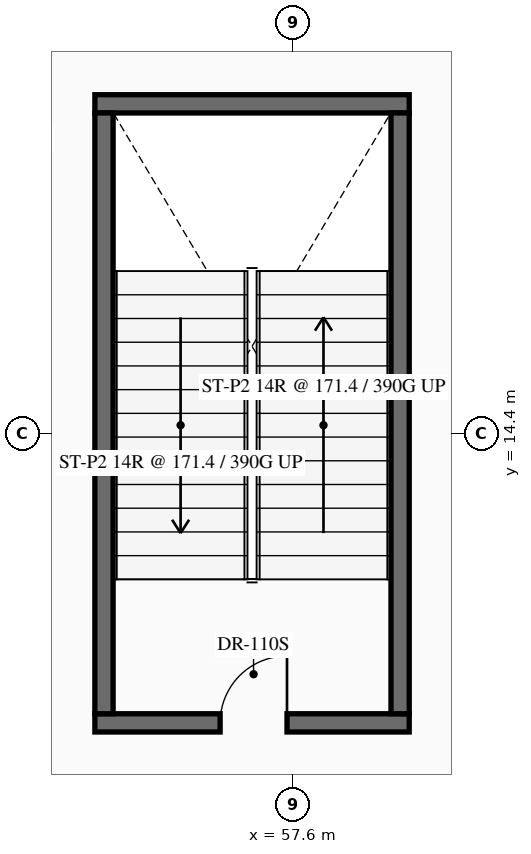
"""IFC4 building model, lengths in metres.
Left out: names, types, materials, properties, quantities, classifications, styles, units other than length and angle.
Written with IfcOpenShell. Run it as: python <this file> out.ifc"""

import sys

from ifc_helpers import new_model, si_unit, direction, frame, frame_2d, origin, place, context, subcontext, project, spatial, rectangle, extrude, element, fill, save


model = new_model("IFC4")
c1 = context("Model", 3, precision=1e-05, world=origin(), true_north=direction((0.0, 1.0)))
c2 = subcontext(c1, "Body", "Model", "MODEL_VIEW")
j1 = project(units=[si_unit("LENGTHUNIT", "METRE"), si_unit("PLANEANGLEUNIT", "RADIAN")], contexts=[c1])
p1 = place(None, origin())
s1 = spatial("IfcSite", under=j1, at=p1, CompositionType="ELEMENT")
p2 = place(p1, origin())
s2 = spatial("IfcBuilding", under=s1, at=p2, CompositionType="ELEMENT")
p3 = place(p2, frame((0.0, 0.0, -4.8)))
s3 = spatial("IfcBuildingStorey", under=s2, at=p3, CompositionType="ELEMENT", Elevation=-4.8)
p4 = place(p3, frame((54.34, 9.64, 0.0), z_axis=(0.0, 0.0, 1.0), x_axis=(1.0, 0.0, 0.0)))
e1 = element("IfcWall", 1, at=p4, inside=s3, PredefinedType="SHEAR", context=c2, shape_type="SweptSolid", body=[
    extrude(rectangle(XDim=5.17, YDim=0.3, at=frame_2d((2.585, 0.0))), origin(), (0.0, 0.0, 1.0), 4.8),
])
p5 = place(p4, frame((2.06, 0.0, 0.0)))
e2 = element("IfcOpeningElement", 2, at=p5, cuts=e1, PredefinedType="OPENING", context=c2, shape_type="SweptSolid", body=[
    extrude(rectangle(XDim=1.1, YDim=2.2, at=frame_2d((0.55, 1.1))), frame((0.0, 0.16, 0.0), z_axis=(0.0, -1.0, 0.0), x_axis=(1.0, 0.0, 0.0)), (0.0, 0.0, 1.0), 0.32),
])
p6 = place(p3, frame((54.34, 19.82, 0.0), z_axis=(0.0, 0.0, 1.0), x_axis=(1.0, 0.0, 0.0)))
e3 = element("IfcWall", 3, at=p6, inside=s3, PredefinedType="SHEAR", context=c2, shape_type="SweptSolid", body=[
    extrude(rectangle(XDim=5.17, YDim=0.3, at=frame_2d((2.585, 0.0))), origin(), (0.0, 0.0, 1.0), 4.8),
])
for number, where, z_axis, x_axis in (
    (4, (54.49, 9.79, 0.0), (0.0, 0.0, 1.0), (0.0, 1.0, 0.0)),
    (5, (59.36, 9.79, 0.0), (0.0, 0.0, 1.0), (0.0, 1.0, 0.0)),
):
    element("IfcWall", number, at=place(p3, frame(where, z_axis=z_axis, x_axis=x_axis)), inside=s3, PredefinedType="SHEAR", context=c2, shape_type="SweptSolid", body=[
        extrude(rectangle(XDim=9.88, YDim=0.3, at=frame_2d((4.94, 0.0))), origin(), (0.0, 0.0, 1.0), 4.8),
    ])
p7 = place(p5, origin())
e6 = element("IfcDoor", 6, at=p7, inside=s3, OperationType="SINGLE_SWING_RIGHT", PredefinedType="DOOR", context=c2, shape_type="SweptSolid", body=[
    extrude(rectangle(XDim=1.1, YDim=2.2, at=frame_2d((0.55, 1.1))), frame((0.0, 0.025, 0.0), z_axis=(0.0, -1.0, 0.0), x_axis=(1.0, 0.0, 0.0)), (0.0, 0.0, 1.0), 0.05),
])
fill(e2, e6)
save(model, sys.argv[1])
